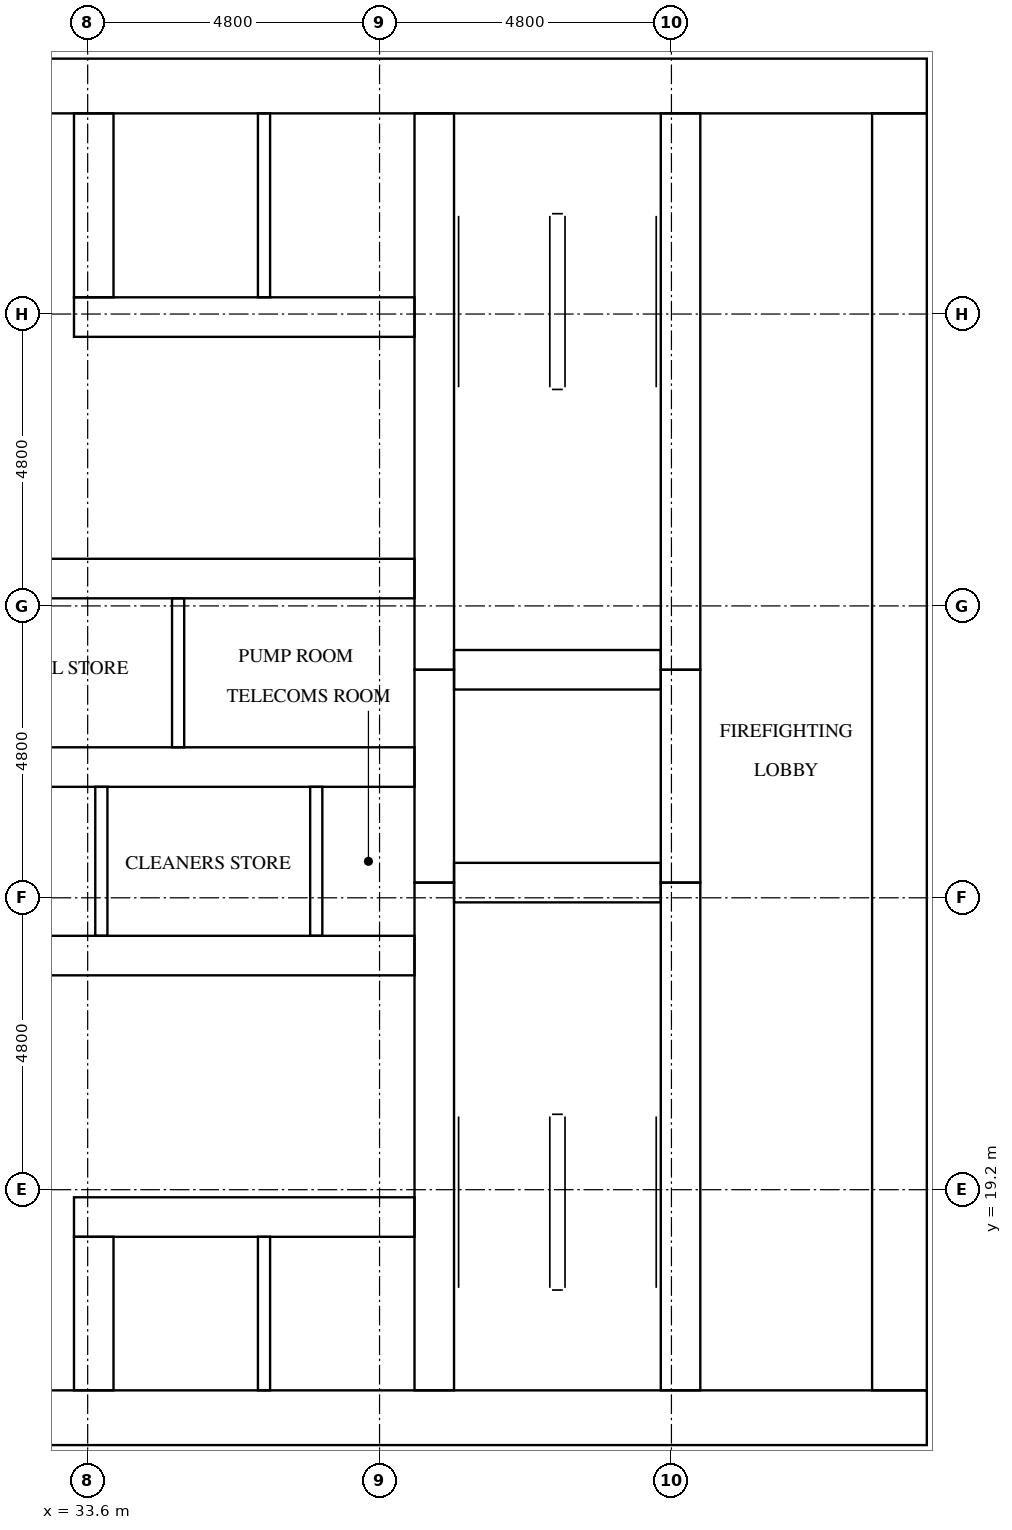
"""IFC4 building model, lengths in metres.
Left out: names, types, materials, properties, quantities, classifications, styles, units other than length and angle.
Written with IfcOpenShell. Run it as: python <this file> out.ifc"""

import sys

from ifc_helpers import new_model, si_unit, direction, frame, frame_2d, origin, place, context, subcontext, project, spatial, rectangle, extrude, element, fill, save


model = new_model("IFC4")
c1 = context("Model", 3, precision=1e-05, world=origin(), true_north=direction((0.0, 1.0)))
c2 = subcontext(c1, "Body", "Model", "MODEL_VIEW")
j1 = project(units=[si_unit("LENGTHUNIT", "METRE"), si_unit("PLANEANGLEUNIT", "RADIAN")], contexts=[c1])
p1 = place(None, origin())
s1 = spatial("IfcSite", under=j1, at=p1, CompositionType="ELEMENT")
p2 = place(p1, origin())
s2 = spatial("IfcBuilding", under=s1, at=p2, CompositionType="ELEMENT")
p3 = place(p2, frame((0.0, 0.0, 103.2)))
s3 = spatial("IfcBuildingStorey", under=s2, at=p3, CompositionType="ELEMENT", Elevation=103.2)
p4 = place(p3, frame((15.0, 15.45, 0.0), z_axis=(0.0, 0.0, 1.0), x_axis=(1.0, 0.0, 0.0)))
e1 = element("IfcWall", 1, at=p4, inside=s3, PredefinedType="SHEAR", context=c2, shape_type="SweptSolid", body=[
    extrude(rectangle(XDim=32.4, YDim=0.9, at=frame_2d((16.2, 0.0))), origin(), (0.0, 0.0, 1.0), 3.2),
])
p5 = place(p4, frame((15.3, 0.0, 0.0)))
e2 = element("IfcOpeningElement", 2, at=p5, cuts=e1, PredefinedType="OPENING", context=c2, shape_type="SweptSolid", body=[
    extrude(rectangle(XDim=1.8, YDim=2.1, at=frame_2d((0.9, 1.05))), frame((0.0, 0.46, 0.0), z_axis=(0.0, -1.0, 0.0), x_axis=(1.0, 0.0, 0.0)), (0.0, 0.0, 1.0), 0.92),
])
p6 = place(p3, frame((15.0, 37.35, 0.0), z_axis=(0.0, 0.0, 1.0), x_axis=(1.0, 0.0, 0.0)))
e3 = element("IfcWall", 3, at=p6, inside=s3, PredefinedType="SHEAR", context=c2, shape_type="SweptSolid", body=[
    extrude(rectangle(XDim=32.4, YDim=0.9, at=frame_2d((16.2, 0.0))), origin(), (0.0, 0.0, 1.0), 3.2),
])
p7 = place(p6, frame((15.3, 0.0, 0.0)))
e4 = element("IfcOpeningElement", 4, at=p7, cuts=e3, PredefinedType="OPENING", context=c2, shape_type="SweptSolid", body=[
    extrude(rectangle(XDim=1.8, YDim=2.1, at=frame_2d((0.9, 1.05))), frame((0.0, 0.46, 0.0), z_axis=(0.0, -1.0, 0.0), x_axis=(1.0, 0.0, 0.0)), (0.0, 0.0, 1.0), 0.92),
])
p8 = place(p6, frame((1.794, 0.0, 0.0)))
e5 = element("IfcOpeningElement", 5, at=p8, cuts=e3, PredefinedType="OPENING", context=c2, shape_type="SweptSolid", body=[
    extrude(rectangle(XDim=1.0, YDim=2.1, at=frame_2d((0.5, 1.05))), frame((0.0, 0.46, 0.0), z_axis=(0.0, -1.0, 0.0), x_axis=(1.0, 0.0, 0.0)), (0.0, 0.0, 1.0), 0.92),
])
p9 = place(p6, frame((5.331, 0.0, 0.0)))
e6 = element("IfcOpeningElement", 6, at=p9, cuts=e3, PredefinedType="OPENING", context=c2, shape_type="SweptSolid", body=[
    extrude(rectangle(XDim=1.0, YDim=2.1, at=frame_2d((0.5, 1.05))), frame((0.0, 0.46, 0.0), z_axis=(0.0, -1.0, 0.0), x_axis=(1.0, 0.0, 0.0)), (0.0, 0.0, 1.0), 0.92),
])
p10 = place(p3, frame((46.95, 15.9, 0.0), z_axis=(0.0, 0.0, 1.0), x_axis=(0.0, 1.0, 0.0)))
e7 = element("IfcWall", 7, at=p10, inside=s3, PredefinedType="SHEAR", context=c2, shape_type="SweptSolid", body=[
    extrude(rectangle(XDim=21.0, YDim=0.9, at=frame_2d((10.5, 0.0))), origin(), (0.0, 0.0, 1.0), 3.2),
])
p11 = place(p10, frame((10.2, 0.0, 0.0)))
e8 = element("IfcOpeningElement", 8, at=p11, cuts=e7, PredefinedType="OPENING", context=c2, shape_type="SweptSolid", body=[
    extrude(rectangle(XDim=1.2, YDim=2.1, at=frame_2d((0.6, 1.05))), frame((0.0, 0.46, 0.0), z_axis=(0.0, -1.0, 0.0), x_axis=(1.0, 0.0, 0.0)), (0.0, 0.0, 1.0), 0.92),
])
p12 = place(p3, frame((39.3, 15.9, 0.0), z_axis=(0.0, 0.0, 1.0), x_axis=(0.0, 1.0, 0.0)))
e9 = element("IfcWall", 9, at=p12, inside=s3, PredefinedType="SHEAR", context=c2, shape_type="SweptSolid", body=[
    extrude(rectangle(XDim=8.35, YDim=0.65, at=frame_2d((4.175, 0.0))), origin(), (0.0, 0.0, 1.0), 3.2),
])
p13 = place(p3, frame((39.3, 24.25, 0.0), z_axis=(0.0, 0.0, 1.0), x_axis=(0.0, 1.0, 0.0)))
e10 = element("IfcWall", 10, at=p13, inside=s3, PredefinedType="SHEAR", context=c2, shape_type="SweptSolid", body=[
    extrude(rectangle(XDim=3.5, YDim=0.65, at=frame_2d((1.75, 0.0))), origin(), (0.0, 0.0, 1.0), 3.2),
])
p14 = place(p3, frame((39.3, 27.75, 0.0), z_axis=(0.0, 0.0, 1.0), x_axis=(0.0, 1.0, 0.0)))
e11 = element("IfcWall", 11, at=p14, inside=s3, PredefinedType="SHEAR", context=c2, shape_type="SweptSolid", body=[
    extrude(rectangle(XDim=9.15, YDim=0.65, at=frame_2d((4.575, 0.0))), origin(), (0.0, 0.0, 1.0), 3.2),
])
p15 = place(p3, frame((43.35, 15.9, 0.0), z_axis=(0.0, 0.0, 1.0), x_axis=(0.0, 1.0, 0.0)))
e12 = element("IfcWall", 12, at=p15, inside=s3, PredefinedType="SHEAR", context=c2, shape_type="SweptSolid", body=[
    extrude(rectangle(XDim=8.35, YDim=0.65, at=frame_2d((4.175, 0.0))), origin(), (0.0, 0.0, 1.0), 3.2),
])
p16 = place(p15, frame((0.3, 0.0, 0.0)))
e13 = element("IfcOpeningElement", 13, at=p16, cuts=e12, PredefinedType="OPENING", context=c2, shape_type="SweptSolid", body=[
    extrude(rectangle(XDim=1.2, YDim=2.1, at=frame_2d((0.6, 1.05))), frame((0.0, 0.335, 0.0), z_axis=(0.0, -1.0, 0.0), x_axis=(1.0, 0.0, 0.0)), (0.0, 0.0, 1.0), 0.67),
])
p17 = place(p3, frame((43.35, 24.25, 0.0), z_axis=(0.0, 0.0, 1.0), x_axis=(0.0, 1.0, 0.0)))
e14 = element("IfcWall", 14, at=p17, inside=s3, PredefinedType="SHEAR", context=c2, shape_type="SweptSolid", body=[
    extrude(rectangle(XDim=3.5, YDim=0.65, at=frame_2d((1.75, 0.0))), origin(), (0.0, 0.0, 1.0), 3.2),
])
p18 = place(p17, frame((1.2, 0.0, 0.0)))
e15 = element("IfcOpeningElement", 15, at=p18, cuts=e14, PredefinedType="OPENING", context=c2, shape_type="SweptSolid", body=[
    extrude(rectangle(XDim=1.1, YDim=2.1, at=frame_2d((0.55, 1.05))), frame((0.0, 0.335, 0.0), z_axis=(0.0, -1.0, 0.0), x_axis=(1.0, 0.0, 0.0)), (0.0, 0.0, 1.0), 0.67),
])
p19 = place(p3, frame((43.35, 27.75, 0.0), z_axis=(0.0, 0.0, 1.0), x_axis=(0.0, 1.0, 0.0)))
e16 = element("IfcWall", 16, at=p19, inside=s3, PredefinedType="SHEAR", context=c2, shape_type="SweptSolid", body=[
    extrude(rectangle(XDim=9.15, YDim=0.65, at=frame_2d((4.575, 0.0))), origin(), (0.0, 0.0, 1.0), 3.2),
])
p20 = place(p19, frame((7.65, 0.0, 0.0)))
e17 = element("IfcOpeningElement", 17, at=p20, cuts=e16, PredefinedType="OPENING", context=c2, shape_type="SweptSolid", body=[
    extrude(rectangle(XDim=1.2, YDim=2.1, at=frame_2d((0.6, 1.05))), frame((0.0, 0.335, 0.0), z_axis=(0.0, -1.0, 0.0), x_axis=(1.0, 0.0, 0.0)), (0.0, 0.0, 1.0), 0.67),
])
for number, where, z_axis, x_axis in (
    (18, (39.625, 24.25, 0.0), (0.0, 0.0, 1.0), (1.0, 0.0, 0.0)),
    (19, (39.625, 27.75, 0.0), (0.0, 0.0, 1.0), (1.0, 0.0, 0.0)),
):
    element("IfcWall", number, at=place(p3, frame(where, z_axis=z_axis, x_axis=x_axis)), inside=s3, PredefinedType="SHEAR", context=c2, shape_type="SweptSolid", body=[
        extrude(rectangle(XDim=3.4, YDim=0.65, at=frame_2d((1.7, 0.0))), origin(), (0.0, 0.0, 1.0), 3.2),
    ])
p21 = place(p3, frame((33.375, 18.75, 0.0), z_axis=(0.0, 0.0, 1.0), x_axis=(1.0, 0.0, 0.0)))
e20 = element("IfcWall", 20, at=p21, inside=s3, PredefinedType="SHEAR", context=c2, shape_type="SweptSolid", body=[
    extrude(rectangle(XDim=5.6, YDim=0.65, at=frame_2d((2.8, 0.0))), origin(), (0.0, 0.0, 1.0), 3.2),
])
p22 = place(p21, frame((1.288, 0.0, 0.0)))
e21 = element("IfcOpeningElement", 21, at=p22, cuts=e20, PredefinedType="OPENING", context=c2, shape_type="SweptSolid", body=[
    extrude(rectangle(XDim=1.1, YDim=2.1, at=frame_2d((0.55, 1.05))), frame((0.0, 0.335, 0.0), z_axis=(0.0, -1.0, 0.0), x_axis=(1.0, 0.0, 0.0)), (0.0, 0.0, 1.0), 0.67),
])
p23 = place(p21, frame((3.863, 0.0, 0.0)))
e22 = element("IfcOpeningElement", 22, at=p23, cuts=e20, PredefinedType="OPENING", context=c2, shape_type="SweptSolid", body=[
    extrude(rectangle(XDim=1.1, YDim=2.1, at=frame_2d((0.55, 1.05))), frame((0.0, 0.335, 0.0), z_axis=(0.0, -1.0, 0.0), x_axis=(1.0, 0.0, 0.0)), (0.0, 0.0, 1.0), 0.67),
])
p24 = place(p3, frame((23.425, 23.05, 0.0), z_axis=(0.0, 0.0, 1.0), x_axis=(1.0, 0.0, 0.0)))
e23 = element("IfcWall", 23, at=p24, inside=s3, PredefinedType="SHEAR", context=c2, shape_type="SweptSolid", body=[
    extrude(rectangle(XDim=15.55, YDim=0.65, at=frame_2d((7.775, 0.0))), origin(), (0.0, 0.0, 1.0), 3.2),
])
p25 = place(p24, frame((2.025, 0.0, 0.0)))
e24 = element("IfcOpeningElement", 24, at=p25, cuts=e23, PredefinedType="OPENING", context=c2, shape_type="SweptSolid", body=[
    extrude(rectangle(XDim=1.0, YDim=2.1, at=frame_2d((0.5, 1.05))), frame((0.0, 0.335, 0.0), z_axis=(0.0, -1.0, 0.0), x_axis=(1.0, 0.0, 0.0)), (0.0, 0.0, 1.0), 0.67),
])
p26 = place(p24, frame((11.667, 0.0, 0.0)))
e25 = element("IfcOpeningElement", 25, at=p26, cuts=e23, PredefinedType="OPENING", context=c2, shape_type="SweptSolid", body=[
    extrude(rectangle(XDim=1.0, YDim=2.1, at=frame_2d((0.5, 1.05))), frame((0.0, 0.335, 0.0), z_axis=(0.0, -1.0, 0.0), x_axis=(1.0, 0.0, 0.0)), (0.0, 0.0, 1.0), 0.67),
])
p27 = place(p24, frame((14.292, 0.0, 0.0)))
e26 = element("IfcOpeningElement", 26, at=p27, cuts=e23, PredefinedType="OPENING", context=c2, shape_type="SweptSolid", body=[
    extrude(rectangle(XDim=1.0, YDim=2.1, at=frame_2d((0.5, 1.05))), frame((0.0, 0.335, 0.0), z_axis=(0.0, -1.0, 0.0), x_axis=(1.0, 0.0, 0.0)), (0.0, 0.0, 1.0), 0.67),
])
p28 = place(p3, frame((23.425, 26.15, 0.0), z_axis=(0.0, 0.0, 1.0), x_axis=(1.0, 0.0, 0.0)))
e27 = element("IfcWall", 27, at=p28, inside=s3, PredefinedType="SHEAR", context=c2, shape_type="SweptSolid", body=[
    extrude(rectangle(XDim=15.55, YDim=0.65, at=frame_2d((7.775, 0.0))), origin(), (0.0, 0.0, 1.0), 3.2),
])
p29 = place(p3, frame((23.425, 29.25, 0.0), z_axis=(0.0, 0.0, 1.0), x_axis=(1.0, 0.0, 0.0)))
e28 = element("IfcWall", 28, at=p29, inside=s3, PredefinedType="SHEAR", context=c2, shape_type="SweptSolid", body=[
    extrude(rectangle(XDim=15.55, YDim=0.65, at=frame_2d((7.775, 0.0))), origin(), (0.0, 0.0, 1.0), 3.2),
])
p30 = place(p29, frame((1.394, 0.0, 0.0)))
e29 = element("IfcOpeningElement", 29, at=p30, cuts=e28, PredefinedType="OPENING", context=c2, shape_type="SweptSolid", body=[
    extrude(rectangle(XDim=1.0, YDim=2.1, at=frame_2d((0.5, 1.05))), frame((0.0, 0.335, 0.0), z_axis=(0.0, -1.0, 0.0), x_axis=(1.0, 0.0, 0.0)), (0.0, 0.0, 1.0), 0.67),
])
p31 = place(p29, frame((5.331, 0.0, 0.0)))
e30 = element("IfcOpeningElement", 30, at=p31, cuts=e28, PredefinedType="OPENING", context=c2, shape_type="SweptSolid", body=[
    extrude(rectangle(XDim=1.0, YDim=2.1, at=frame_2d((0.5, 1.05))), frame((0.0, 0.335, 0.0), z_axis=(0.0, -1.0, 0.0), x_axis=(1.0, 0.0, 0.0)), (0.0, 0.0, 1.0), 0.67),
])
p32 = place(p29, frame((9.219, 0.0, 0.0)))
e31 = element("IfcOpeningElement", 31, at=p32, cuts=e28, PredefinedType="OPENING", context=c2, shape_type="SweptSolid", body=[
    extrude(rectangle(XDim=1.0, YDim=2.1, at=frame_2d((0.5, 1.05))), frame((0.0, 0.335, 0.0), z_axis=(0.0, -1.0, 0.0), x_axis=(1.0, 0.0, 0.0)), (0.0, 0.0, 1.0), 0.67),
])
p33 = place(p29, frame((13.156, 0.0, 0.0)))
e32 = element("IfcOpeningElement", 32, at=p33, cuts=e28, PredefinedType="OPENING", context=c2, shape_type="SweptSolid", body=[
    extrude(rectangle(XDim=1.0, YDim=2.1, at=frame_2d((0.5, 1.05))), frame((0.0, 0.335, 0.0), z_axis=(0.0, -1.0, 0.0), x_axis=(1.0, 0.0, 0.0)), (0.0, 0.0, 1.0), 0.67),
])
p34 = place(p3, frame((33.375, 33.55, 0.0), z_axis=(0.0, 0.0, 1.0), x_axis=(1.0, 0.0, 0.0)))
e33 = element("IfcWall", 33, at=p34, inside=s3, PredefinedType="SHEAR", context=c2, shape_type="SweptSolid", body=[
    extrude(rectangle(XDim=5.6, YDim=0.65, at=frame_2d((2.8, 0.0))), origin(), (0.0, 0.0, 1.0), 3.2),
])
p35 = place(p3, frame((33.7, 15.9, 0.0), z_axis=(0.0, 0.0, 1.0), x_axis=(0.0, 1.0, 0.0)))
e34 = element("IfcWall", 34, at=p35, inside=s3, PredefinedType="SHEAR", context=c2, shape_type="SweptSolid", body=[
    extrude(rectangle(XDim=2.525, YDim=0.65, at=frame_2d((1.263, 0.0))), origin(), (0.0, 0.0, 1.0), 3.2),
])
p36 = place(p3, frame((33.7, 33.875, 0.0), z_axis=(0.0, 0.0, 1.0), x_axis=(0.0, 1.0, 0.0)))
e35 = element("IfcWall", 35, at=p36, inside=s3, PredefinedType="SHEAR", context=c2, shape_type="SweptSolid", body=[
    extrude(rectangle(XDim=3.025, YDim=0.65, at=frame_2d((1.512, 0.0))), origin(), (0.0, 0.0, 1.0), 3.2),
])
p37 = place(p3, frame((33.825, 23.375, 0.0), z_axis=(0.0, 0.0, 1.0), x_axis=(0.0, 1.0, 0.0)))
e36 = element("IfcWall", 36, at=p37, inside=s3, PredefinedType="SOLIDWALL", context=c2, shape_type="SweptSolid", body=[
    extrude(rectangle(XDim=2.45, YDim=0.2, at=frame_2d((1.225, 0.0))), origin(), (0.0, 0.0, 1.0), 3.2),
])
p38 = place(p3, frame((36.5, 15.9, 0.0), z_axis=(0.0, 0.0, 1.0), x_axis=(0.0, 1.0, 0.0)))
e37 = element("IfcWall", 37, at=p38, inside=s3, PredefinedType="SOLIDWALL", context=c2, shape_type="SweptSolid", body=[
    extrude(rectangle(XDim=2.525, YDim=0.2, at=frame_2d((1.263, 0.0))), origin(), (0.0, 0.0, 1.0), 3.2),
])
p39 = place(p3, frame((36.5, 33.875, 0.0), z_axis=(0.0, 0.0, 1.0), x_axis=(0.0, 1.0, 0.0)))
e38 = element("IfcWall", 38, at=p39, inside=s3, PredefinedType="SOLIDWALL", context=c2, shape_type="SweptSolid", body=[
    extrude(rectangle(XDim=3.025, YDim=0.2, at=frame_2d((1.512, 0.0))), origin(), (0.0, 0.0, 1.0), 3.2),
])
for number, where, z_axis, x_axis in (
    (39, (37.359, 23.375, 0.0), (0.0, 0.0, 1.0), (0.0, 1.0, 0.0)),
    (40, (35.087, 26.475, 0.0), (0.0, 0.0, 1.0), (0.0, 1.0, 0.0)),
):
    element("IfcWall", number, at=place(p3, frame(where, z_axis=z_axis, x_axis=x_axis)), inside=s3, PredefinedType="PARTITIONING", context=c2, shape_type="SweptSolid", body=[
        extrude(rectangle(XDim=2.45, YDim=0.2, at=frame_2d((1.225, 0.0))), origin(), (0.0, 0.0, 1.0), 3.2),
    ])
p40 = place(p22, origin())
e41 = element("IfcDoor", 41, at=p40, inside=s3, OperationType="DOUBLE_DOOR_SLIDING", PredefinedType="DOOR", context=c2, shape_type="SweptSolid", body=[
    extrude(rectangle(XDim=1.1, YDim=2.1, at=frame_2d((0.55, 1.05))), frame((0.0, 0.025, 0.0), z_axis=(0.0, -1.0, 0.0), x_axis=(1.0, 0.0, 0.0)), (0.0, 0.0, 1.0), 0.05),
])
fill(e21, e41)
p41 = place(p23, origin())
e42 = element("IfcDoor", 42, at=p41, inside=s3, OperationType="DOUBLE_DOOR_SLIDING", PredefinedType="DOOR", context=c2, shape_type="SweptSolid", body=[
    extrude(rectangle(XDim=1.1, YDim=2.1, at=frame_2d((0.55, 1.05))), frame((0.0, 0.025, 0.0), z_axis=(0.0, -1.0, 0.0), x_axis=(1.0, 0.0, 0.0)), (0.0, 0.0, 1.0), 0.05),
])
fill(e22, e42)
p42 = place(p18, origin())
e43 = element("IfcDoor", 43, at=p42, inside=s3, OperationType="DOUBLE_DOOR_SLIDING", PredefinedType="DOOR", context=c2, shape_type="SweptSolid", body=[
    extrude(rectangle(XDim=1.1, YDim=2.1, at=frame_2d((0.55, 1.05))), frame((0.0, 0.025, 0.0), z_axis=(0.0, -1.0, 0.0), x_axis=(1.0, 0.0, 0.0)), (0.0, 0.0, 1.0), 0.05),
])
fill(e15, e43)
p43 = place(p16, origin())
e44 = element("IfcDoor", 44, at=p43, inside=s3, OperationType="SINGLE_SWING_LEFT", PredefinedType="DOOR", context=c2, shape_type="SweptSolid", body=[
    extrude(rectangle(XDim=1.2, YDim=2.1, at=frame_2d((0.6, 1.05))), frame((0.0, 0.025, 0.0), z_axis=(0.0, -1.0, 0.0), x_axis=(1.0, 0.0, 0.0)), (0.0, 0.0, 1.0), 0.05),
])
fill(e13, e44)
p44 = place(p20, origin())
e45 = element("IfcDoor", 45, at=p44, inside=s3, OperationType="SINGLE_SWING_RIGHT", PredefinedType="DOOR", context=c2, shape_type="SweptSolid", body=[
    extrude(rectangle(XDim=1.2, YDim=2.1, at=frame_2d((0.6, 1.05))), frame((0.0, 0.025, 0.0), z_axis=(0.0, -1.0, 0.0), x_axis=(1.0, 0.0, 0.0)), (0.0, 0.0, 1.0), 0.05),
])
fill(e17, e45)
p45 = place(p11, origin())
e46 = element("IfcDoor", 46, at=p45, inside=s3, OperationType="SINGLE_SWING_RIGHT", PredefinedType="DOOR", context=c2, shape_type="SweptSolid", body=[
    extrude(rectangle(XDim=1.2, YDim=2.1, at=frame_2d((0.6, 1.05))), frame((0.0, 0.025, 0.0), z_axis=(0.0, -1.0, 0.0), x_axis=(1.0, 0.0, 0.0)), (0.0, 0.0, 1.0), 0.05),
])
fill(e8, e46)
p46 = place(p26, frame((1.0, 0.0, 0.0), z_axis=(0.0, 0.0, 1.0), x_axis=(-1.0, 0.0, 0.0)))
e47 = element("IfcDoor", 47, at=p46, inside=s3, OperationType="SINGLE_SWING_RIGHT", PredefinedType="DOOR", context=c2, shape_type="SweptSolid", body=[
    extrude(rectangle(XDim=1.0, YDim=2.1, at=frame_2d((0.5, 1.05))), frame((0.0, 0.025, 0.0), z_axis=(0.0, -1.0, 0.0), x_axis=(1.0, 0.0, 0.0)), (0.0, 0.0, 1.0), 0.05),
])
fill(e25, e47)
p47 = place(p27, frame((1.0, 0.0, 0.0), z_axis=(0.0, 0.0, 1.0), x_axis=(-1.0, 0.0, 0.0)))
e48 = element("IfcDoor", 48, at=p47, inside=s3, OperationType="SINGLE_SWING_LEFT", PredefinedType="DOOR", context=c2, shape_type="SweptSolid", body=[
    extrude(rectangle(XDim=1.0, YDim=2.1, at=frame_2d((0.5, 1.05))), frame((0.0, 0.025, 0.0), z_axis=(0.0, -1.0, 0.0), x_axis=(1.0, 0.0, 0.0)), (0.0, 0.0, 1.0), 0.05),
])
fill(e26, e48)
p48 = place(p32, origin())
e49 = element("IfcDoor", 49, at=p48, inside=s3, OperationType="SINGLE_SWING_RIGHT", PredefinedType="DOOR", context=c2, shape_type="SweptSolid", body=[
    extrude(rectangle(XDim=1.0, YDim=2.1, at=frame_2d((0.5, 1.05))), frame((0.0, 0.025, 0.0), z_axis=(0.0, -1.0, 0.0), x_axis=(1.0, 0.0, 0.0)), (0.0, 0.0, 1.0), 0.05),
])
fill(e31, e49)
p49 = place(p33, origin())
e50 = element("IfcDoor", 50, at=p49, inside=s3, OperationType="SINGLE_SWING_LEFT", PredefinedType="DOOR", context=c2, shape_type="SweptSolid", body=[
    extrude(rectangle(XDim=1.0, YDim=2.1, at=frame_2d((0.5, 1.05))), frame((0.0, 0.025, 0.0), z_axis=(0.0, -1.0, 0.0), x_axis=(1.0, 0.0, 0.0)), (0.0, 0.0, 1.0), 0.05),
])
fill(e32, e50)
save(model, sys.argv[1])
